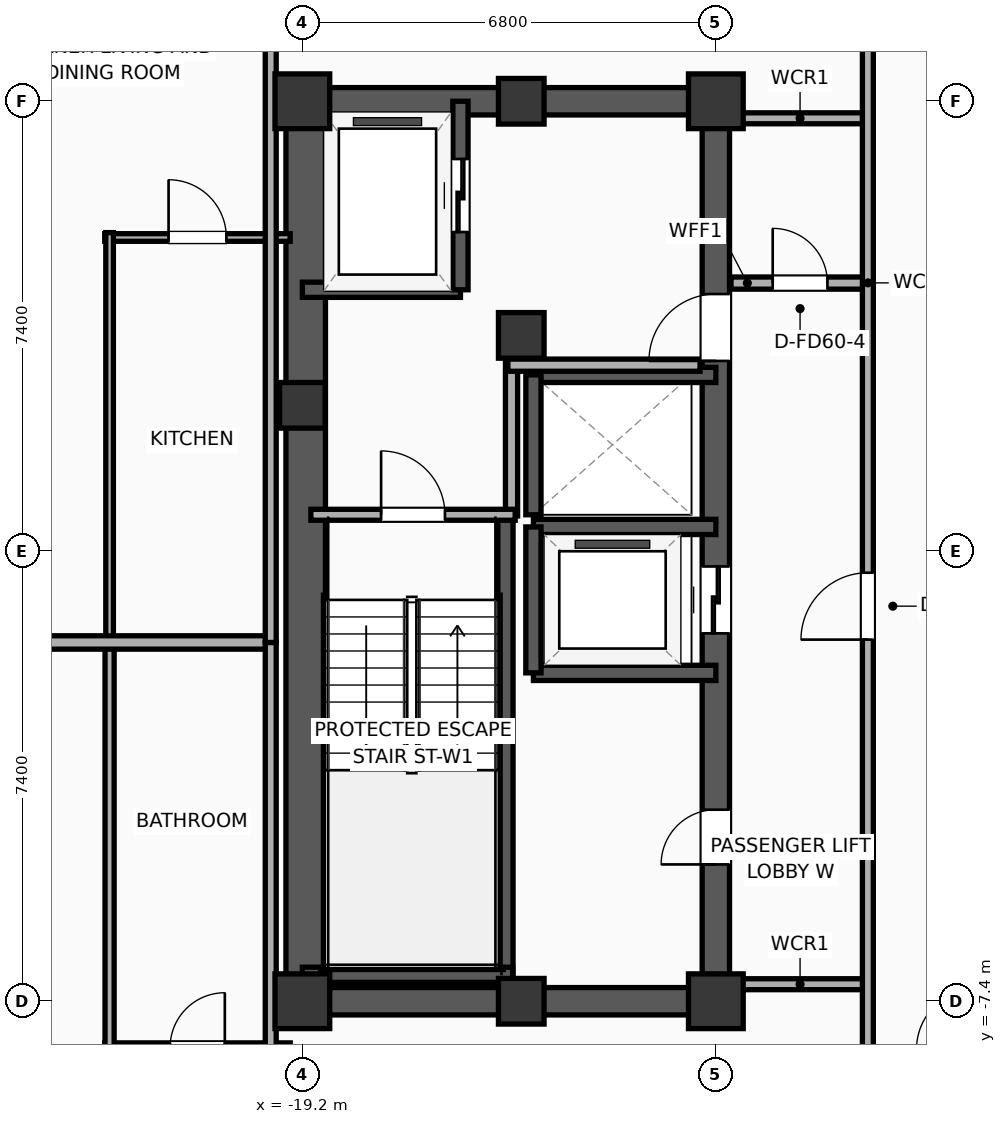
"""IFC4 building model, lengths in metres.
Left out: names, types, materials, properties, quantities, classifications, styles, units other than length and angle.
Written with IfcOpenShell. Run it as: python <this file> out.ifc"""

import sys

from ifc_helpers import new_model, si_unit, direction, frame, frame_2d, origin, origin_2d, place, context, subcontext, project, spatial, rectangle, extrude, element, fill, save


model = new_model("IFC4")
c1 = context("Model", 3, precision=1e-05, world=origin(), true_north=direction((0.0, 1.0)))
c2 = subcontext(c1, "Body", "Model", "MODEL_VIEW")
j1 = project(units=[si_unit("LENGTHUNIT", "METRE"), si_unit("PLANEANGLEUNIT", "RADIAN")], contexts=[c1])
p1 = place(None, origin())
s1 = spatial("IfcSite", under=j1, at=p1, CompositionType="ELEMENT")
p2 = place(p1, origin())
s2 = spatial("IfcBuilding", under=s1, at=p2, CompositionType="ELEMENT")
p3 = place(p2, frame((0.0, 0.0, 156.0)))
s3 = spatial("IfcBuildingStorey", under=s2, at=p3, CompositionType="ELEMENT", Elevation=156.0)
p4 = place(p3, frame((-19.2, -7.4, 0.0), z_axis=(0.0, 0.0, 1.0), x_axis=(1.0, 0.0, 0.0)))
e1 = element("IfcColumn", 1, at=p4, inside=s3, PredefinedType="COLUMN", context=c2, shape_type="SweptSolid", body=[
    extrude(rectangle(XDim=0.9, YDim=0.9, at=origin_2d()), origin(), (0.0, 0.0, 1.0), 3.9),
])
p5 = place(p3, frame((-19.2, 2.4, 0.0), z_axis=(0.0, 0.0, 1.0), x_axis=(1.0, 0.0, 0.0)))
e2 = element("IfcColumn", 2, at=p5, inside=s3, PredefinedType="COLUMN", context=c2, shape_type="SweptSolid", body=[
    extrude(rectangle(XDim=0.75, YDim=0.75, at=origin_2d()), origin(), (0.0, 0.0, 1.0), 3.9),
])
p6 = place(p3, frame((-19.2, 7.4, 0.0), z_axis=(0.0, 0.0, 1.0), x_axis=(1.0, 0.0, 0.0)))
e3 = element("IfcColumn", 3, at=p6, inside=s3, PredefinedType="COLUMN", context=c2, shape_type="SweptSolid", body=[
    extrude(rectangle(XDim=0.9, YDim=0.9, at=origin_2d()), origin(), (0.0, 0.0, 1.0), 3.9),
])
for number, where, z_axis, x_axis in (
    (4, (-15.6, -7.4, 0.0), (0.0, 0.0, 1.0), (1.0, 0.0, 0.0)),
    (5, (-15.6, 7.4, 0.0), (0.0, 0.0, 1.0), (1.0, 0.0, 0.0)),
):
    element("IfcColumn", number, at=place(p3, frame(where, z_axis=z_axis, x_axis=x_axis)), inside=s3, PredefinedType="COLUMN", context=c2, shape_type="SweptSolid", body=[
        extrude(rectangle(XDim=0.75, YDim=0.75, at=origin_2d()), origin(), (0.0, 0.0, 1.0), 3.9),
    ])
p7 = place(p3, frame((-12.4, -7.4, 0.0), z_axis=(0.0, 0.0, 1.0), x_axis=(1.0, 0.0, 0.0)))
e6 = element("IfcColumn", 6, at=p7, inside=s3, PredefinedType="COLUMN", context=c2, shape_type="SweptSolid", body=[
    extrude(rectangle(XDim=0.9, YDim=0.9, at=origin_2d()), origin(), (0.0, 0.0, 1.0), 3.9),
])
p8 = place(p3, frame((-15.6, 3.55, 0.0), z_axis=(0.0, 0.0, 1.0), x_axis=(1.0, 0.0, 0.0)))
e7 = element("IfcColumn", 7, at=p8, inside=s3, PredefinedType="COLUMN", context=c2, shape_type="SweptSolid", body=[
    extrude(rectangle(XDim=0.75, YDim=0.75, at=origin_2d()), origin(), (0.0, 0.0, 1.0), 3.9),
])
p9 = place(p3, frame((-12.4, 7.4, 0.0), z_axis=(0.0, 0.0, 1.0), x_axis=(1.0, 0.0, 0.0)))
e8 = element("IfcColumn", 8, at=p9, inside=s3, PredefinedType="COLUMN", context=c2, shape_type="SweptSolid", body=[
    extrude(rectangle(XDim=0.9, YDim=0.9, at=origin_2d()), origin(), (0.0, 0.0, 1.0), 3.9),
])
for number, where, z_axis, x_axis in (
    (9, (-19.425, -7.4, 0.0), (0.0, 0.0, 1.0), (1.0, 0.0, 0.0)),
    (10, (-19.425, 7.4, 0.0), (0.0, 0.0, 1.0), (1.0, 0.0, 0.0)),
):
    element("IfcWall", number, at=place(p3, frame(where, z_axis=z_axis, x_axis=x_axis)), inside=s3, PredefinedType="SHEAR", context=c2, shape_type="SweptSolid", body=[
        extrude(rectangle(XDim=7.25, YDim=0.45, at=frame_2d((3.625, 0.0))), origin(), (0.0, 0.0, 1.0), 3.65),
    ])
p10 = place(p3, frame((-19.145, -7.4, 0.0), z_axis=(0.0, 0.0, 1.0), x_axis=(0.0, 1.0, 0.0)))
e11 = element("IfcWall", 11, at=p10, inside=s3, PredefinedType="SHEAR", context=c2, shape_type="SweptSolid", body=[
    extrude(rectangle(XDim=14.8, YDim=0.65, at=frame_2d((7.4, 0.0))), origin(), (0.0, 0.0, 1.0), 3.65),
])
p11 = place(p3, frame((-12.4, -7.4, 0.0), z_axis=(0.0, 0.0, 1.0), x_axis=(0.0, 1.0, 0.0)))
e12 = element("IfcWall", 12, at=p11, inside=s3, PredefinedType="SHEAR", context=c2, shape_type="SweptSolid", body=[
    extrude(rectangle(XDim=14.8, YDim=0.45, at=frame_2d((7.4, 0.0))), origin(), (0.0, 0.0, 1.0), 3.65),
])
p12 = place(p11, frame((6.05, 0.0, 0.0)))
e13 = element("IfcOpeningElement", 13, at=p12, cuts=e12, PredefinedType="OPENING", context=c2, shape_type="SweptSolid", body=[
    extrude(rectangle(XDim=1.1, YDim=2.05, at=frame_2d((0.55, 1.025))), frame((0.0, 0.235, 0.0), z_axis=(0.0, -1.0, 0.0), x_axis=(1.0, 0.0, 0.0)), (0.0, 0.0, 1.0), 0.47),
])
p13 = place(p11, frame((10.53, 0.0, 0.0)))
e14 = element("IfcOpeningElement", 14, at=p13, cuts=e12, PredefinedType="OPENING", context=c2, shape_type="SweptSolid", body=[
    extrude(rectangle(XDim=1.1, YDim=2.05, at=frame_2d((0.55, 1.025))), frame((0.0, 0.235, 0.0), z_axis=(0.0, -1.0, 0.0), x_axis=(1.0, 0.0, 0.0)), (0.0, 0.0, 1.0), 0.47),
])
p14 = place(p11, frame((2.25, 0.0, 0.0)))
e15 = element("IfcOpeningElement", 15, at=p14, cuts=e12, PredefinedType="OPENING", context=c2, shape_type="SweptSolid", body=[
    extrude(rectangle(XDim=0.9, YDim=2.05, at=frame_2d((0.45, 1.025))), frame((0.0, 0.235, 0.0), z_axis=(0.0, -1.0, 0.0), x_axis=(1.0, 0.0, 0.0)), (0.0, 0.0, 1.0), 0.47),
])
p15 = place(p3, frame((-15.86, -7.085, 0.0), z_axis=(0.0, 0.0, 1.0), x_axis=(0.0, 1.0, 0.0)))
e16 = element("IfcWall", 16, at=p15, inside=s3, PredefinedType="SOLIDWALL", context=c2, shape_type="SweptSolid", body=[
    extrude(rectangle(XDim=7.685, YDim=0.25, at=frame_2d((3.843, 0.0))), origin(), (0.0, 0.0, 1.0), 3.65),
])
p16 = place(p3, frame((-19.2, -6.965, 0.0), z_axis=(0.0, 0.0, 1.0), x_axis=(1.0, 0.0, 0.0)))
e17 = element("IfcWall", 17, at=p16, inside=s3, PredefinedType="SOLIDWALL", context=c2, shape_type="SweptSolid", body=[
    extrude(rectangle(XDim=3.46, YDim=0.25, at=frame_2d((1.73, 0.0))), origin(), (0.0, 0.0, 1.0), 3.65),
])
p17 = place(p3, frame((-19.2, 4.3, 0.0), z_axis=(0.0, 0.0, 1.0), x_axis=(1.0, 0.0, 0.0)))
e18 = element("IfcWall", 18, at=p17, inside=s3, PredefinedType="SOLIDWALL", context=c2, shape_type="SweptSolid", body=[
    extrude(rectangle(XDim=2.6, YDim=0.25, at=frame_2d((1.3, 0.0))), origin(), (0.0, 0.0, 1.0), 3.65),
])
p18 = place(p3, frame((-16.6, 4.3, 0.0), z_axis=(0.0, 0.0, 1.0), x_axis=(0.0, 1.0, 0.0)))
e19 = element("IfcWall", 19, at=p18, inside=s3, PredefinedType="SOLIDWALL", context=c2, shape_type="SweptSolid", body=[
    extrude(rectangle(XDim=3.1, YDim=0.25, at=frame_2d((1.55, 0.0))), origin(), (0.0, 0.0, 1.0), 3.65),
])
p19 = place(p18, frame((0.95, 0.0, 0.0)))
e20 = element("IfcOpeningElement", 20, at=p19, cuts=e19, PredefinedType="OPENING", context=c2, shape_type="SweptSolid", body=[
    extrude(rectangle(XDim=1.2, YDim=2.05, at=frame_2d((0.6, 1.025))), frame((0.0, 0.135, 0.0), z_axis=(0.0, -1.0, 0.0), x_axis=(1.0, 0.0, 0.0)), (0.0, 0.0, 1.0), 0.27),
])
for number, where, z_axis, x_axis in (
    (21, (-15.4, -2.0, 0.0), (0.0, 0.0, 1.0), (1.0, 0.0, 0.0)),
    (22, (-12.4, 0.4, 0.0), (0.0, 0.0, 1.0), (-1.0, 0.0, 0.0)),
):
    element("IfcWall", number, at=place(p3, frame(where, z_axis=z_axis, x_axis=x_axis)), inside=s3, PredefinedType="SOLIDWALL", context=c2, shape_type="SweptSolid", body=[
        extrude(rectangle(XDim=3.0, YDim=0.25, at=frame_2d((1.5, 0.0))), origin(), (0.0, 0.0, 1.0), 3.65),
    ])
p20 = place(p3, frame((-15.4, 0.4, 0.0), z_axis=(0.0, 0.0, 1.0), x_axis=(0.0, -1.0, 0.0)))
e23 = element("IfcWall", 23, at=p20, inside=s3, PredefinedType="SOLIDWALL", context=c2, shape_type="SweptSolid", body=[
    extrude(rectangle(XDim=2.4, YDim=0.25, at=frame_2d((1.2, 0.0))), origin(), (0.0, 0.0, 1.0), 3.65),
])
p21 = place(p3, frame((-12.4, 2.9, 0.0), z_axis=(0.0, 0.0, 1.0), x_axis=(-1.0, 0.0, 0.0)))
e24 = element("IfcWall", 24, at=p21, inside=s3, PredefinedType="SOLIDWALL", context=c2, shape_type="SweptSolid", body=[
    extrude(rectangle(XDim=3.0, YDim=0.25, at=frame_2d((1.5, 0.0))), origin(), (0.0, 0.0, 1.0), 3.65),
])
p22 = place(p3, frame((-15.4, 2.9, 0.0), z_axis=(0.0, 0.0, 1.0), x_axis=(0.0, -1.0, 0.0)))
e25 = element("IfcWall", 25, at=p22, inside=s3, PredefinedType="SOLIDWALL", context=c2, shape_type="SweptSolid", body=[
    extrude(rectangle(XDim=2.3, YDim=0.25, at=frame_2d((1.15, 0.0))), origin(), (0.0, 0.0, 1.0), 3.65),
])
p23 = place(p3, frame((-15.76, 0.58, 0.0), z_axis=(0.0, 0.0, 1.0), x_axis=(0.0, 1.0, 0.0)))
e26 = element("IfcWall", 26, at=p23, inside=s3, PredefinedType="PARTITIONING", context=c2, shape_type="SweptSolid", body=[
    extrude(rectangle(XDim=2.52, YDim=0.2, at=frame_2d((1.26, 0.0))), origin(), (0.0, 0.0, 1.0), 3.65),
])
p24 = place(p3, frame((-15.82, 3.06, 0.0), z_axis=(0.0, 0.0, 1.0), x_axis=(1.0, 0.0, 0.0)))
e27 = element("IfcWall", 27, at=p24, inside=s3, PredefinedType="PARTITIONING", context=c2, shape_type="SweptSolid", body=[
    extrude(rectangle(XDim=3.16, YDim=0.2, at=frame_2d((1.58, 0.0))), origin(), (0.0, 0.0, 1.0), 3.65),
])
p25 = place(p3, frame((-19.06, 0.6, 0.0), z_axis=(0.0, 0.0, 1.0), x_axis=(1.0, 0.0, 0.0)))
e28 = element("IfcWall", 28, at=p25, inside=s3, PredefinedType="PARTITIONING", context=c2, shape_type="SweptSolid", body=[
    extrude(rectangle(XDim=3.36, YDim=0.18, at=frame_2d((1.68, 0.0))), origin(), (0.0, 0.0, 1.0), 3.65),
])
p26 = place(p25, frame((1.155, 0.0, 0.0)))
e29 = element("IfcOpeningElement", 29, at=p26, cuts=e28, PredefinedType="OPENING", context=c2, shape_type="SweptSolid", body=[
    extrude(rectangle(XDim=1.05, YDim=2.05, at=frame_2d((0.525, 1.025))), frame((0.0, 0.1, 0.0), z_axis=(0.0, -1.0, 0.0), x_axis=(1.0, 0.0, 0.0)), (0.0, 0.0, 1.0), 0.2),
])
p27 = place(p3, frame((-12.15, 4.41, 0.0), z_axis=(0.0, 0.0, 1.0), x_axis=(1.0, 0.0, 0.0)))
e30 = element("IfcWall", 30, at=p27, inside=s3, PredefinedType="PARTITIONING", context=c2, shape_type="SweptSolid", body=[
    extrude(rectangle(XDim=2.27, YDim=0.2, at=frame_2d((1.135, 0.0))), origin(), (0.0, 0.0, 1.0), 3.65),
])
p28 = place(p27, frame((0.685, 0.0, 0.0)))
e31 = element("IfcOpeningElement", 31, at=p28, cuts=e30, PredefinedType="OPENING", context=c2, shape_type="SweptSolid", body=[
    extrude(rectangle(XDim=0.9, YDim=2.05, at=frame_2d((0.45, 1.025))), frame((0.0, 0.11, 0.0), z_axis=(0.0, -1.0, 0.0), x_axis=(1.0, 0.0, 0.0)), (0.0, 0.0, 1.0), 0.22),
])
for number, where, z_axis, x_axis in (
    (32, (-12.15, 7.12, 0.0), (0.0, 0.0, 1.0), (1.0, 0.0, 0.0)),
    (33, (-12.15, -7.12, 0.0), (0.0, 0.0, 1.0), (1.0, 0.0, 0.0)),
):
    element("IfcWall", number, at=place(p3, frame(where, z_axis=z_axis, x_axis=x_axis)), inside=s3, PredefinedType="PARTITIONING", context=c2, shape_type="SweptSolid", body=[
        extrude(rectangle(XDim=2.27, YDim=0.18, at=frame_2d((1.135, 0.0))), origin(), (0.0, 0.0, 1.0), 3.65),
    ])
p29 = place(p3, frame((-9.9, -9.03, 0.0), z_axis=(0.0, 0.0, 1.0), x_axis=(0.0, 1.0, 0.0)))
e34 = element("IfcWall", 34, at=p29, inside=s3, PredefinedType="PARTITIONING", context=c2, shape_type="SweptSolid", body=[
    extrude(rectangle(XDim=18.06, YDim=0.18, at=frame_2d((9.03, 0.0))), origin(), (0.0, 0.0, 1.0), 3.65),
])
p30 = place(p29, frame((7.577, 0.0, 0.0)))
e35 = element("IfcOpeningElement", 35, at=p30, cuts=e34, PredefinedType="OPENING", context=c2, shape_type="SweptSolid", body=[
    extrude(rectangle(XDim=1.1, YDim=2.05, at=frame_2d((0.55, 1.025))), frame((0.0, 0.1, 0.0), z_axis=(0.0, -1.0, 0.0), x_axis=(1.0, 0.0, 0.0)), (0.0, 0.0, 1.0), 0.2),
])
p31 = place(p3, frame((-22.45, -8.16, 0.0), z_axis=(0.0, 0.0, 1.0), x_axis=(1.0, 0.0, 0.0)))
e36 = element("IfcWall", 36, at=p31, inside=s3, PredefinedType="PLUMBINGWALL", context=c2, shape_type="SweptSolid", body=[
    extrude(rectangle(XDim=3.05, YDim=0.15, at=frame_2d((1.525, 0.0))), origin(), (0.0, 0.0, 1.0), 3.04),
])
p32 = place(p31, frame((1.075, 0.0, 0.0)))
e37 = element("IfcOpeningElement", 37, at=p32, cuts=e36, PredefinedType="OPENING", context=c2, shape_type="SweptSolid", body=[
    extrude(rectangle(XDim=0.9, YDim=2.05, at=frame_2d((0.45, 1.025))), frame((0.0, 0.085, 0.0), z_axis=(0.0, -1.0, 0.0), x_axis=(1.0, 0.0, 0.0)), (0.0, 0.0, 1.0), 0.17),
])
p33 = place(p3, frame((-22.37, -8.24, 0.0), z_axis=(0.0, 0.0, 1.0), x_axis=(0.0, 1.0, 0.0)))
e38 = element("IfcWall", 38, at=p33, inside=s3, PredefinedType="PLUMBINGWALL", context=c2, shape_type="SweptSolid", body=[
    extrude(rectangle(XDim=6.72, YDim=0.15, at=frame_2d((3.36, 0.0))), origin(), (0.0, 0.0, 1.0), 3.65),
])
p34 = place(p3, frame((-22.45, 5.16, 0.0), z_axis=(0.0, 0.0, 1.0), x_axis=(1.0, 0.0, 0.0)))
e39 = element("IfcWall", 39, at=p34, inside=s3, PredefinedType="PARTITIONING", context=c2, shape_type="SweptSolid", body=[
    extrude(rectangle(XDim=3.05, YDim=0.125, at=frame_2d((1.525, 0.0))), origin(), (0.0, 0.0, 1.0), 3.65),
])
p35 = place(p34, frame((1.05, 0.0, 0.0)))
e40 = element("IfcOpeningElement", 40, at=p35, cuts=e39, PredefinedType="OPENING", context=c2, shape_type="SweptSolid", body=[
    extrude(rectangle(XDim=0.95, YDim=2.05, at=frame_2d((0.475, 1.025))), frame((0.0, 0.073, 0.0), z_axis=(0.0, -1.0, 0.0), x_axis=(1.0, 0.0, 0.0)), (0.0, 0.0, 1.0), 0.145),
])
p36 = place(p3, frame((-22.37, -1.48, 0.0), z_axis=(0.0, 0.0, 1.0), x_axis=(0.0, 1.0, 0.0)))
e41 = element("IfcWall", 41, at=p36, inside=s3, PredefinedType="PARTITIONING", context=c2, shape_type="SweptSolid", body=[
    extrude(rectangle(XDim=6.72, YDim=0.125, at=frame_2d((3.36, 0.0))), origin(), (0.0, 0.0, 1.0), 3.65),
])
p37 = place(p3, frame((-19.72, -1.5, 0.0), z_axis=(0.0, 0.0, 1.0), x_axis=(-1.0, 0.0, 0.0)))
e42 = element("IfcWall", 42, at=p37, inside=s3, PredefinedType="PARTITIONING", context=c2, shape_type="SweptSolid", body=[
    extrude(rectangle(XDim=13.179, YDim=0.22, at=frame_2d((6.589, 0.0))), origin(), (0.0, 0.0, 1.0), 3.65),
])
p38 = place(p3, frame((-19.72, -22.678, 0.0), z_axis=(0.0, 0.0, 1.0), x_axis=(0.0, 1.0, 0.0)))
e43 = element("IfcWall", 43, at=p38, inside=s3, PredefinedType="PARTITIONING", context=c2, shape_type="SweptSolid", body=[
    extrude(rectangle(XDim=21.178, YDim=0.18, at=frame_2d((10.589, 0.0))), origin(), (0.0, 0.0, 1.0), 3.65),
])
p39 = place(p38, frame((12.547, 0.0, 0.0)))
e44 = element("IfcOpeningElement", 44, at=p39, cuts=e43, PredefinedType="OPENING", context=c2, shape_type="SweptSolid", body=[
    extrude(rectangle(XDim=0.9, YDim=2.05, at=frame_2d((0.45, 1.025))), frame((0.0, 0.1, 0.0), z_axis=(0.0, -1.0, 0.0), x_axis=(1.0, 0.0, 0.0)), (0.0, 0.0, 1.0), 0.2),
])
p40 = place(p3, frame((-19.72, -1.5, 0.0), z_axis=(0.0, 0.0, 1.0), x_axis=(0.0, 1.0, 0.0)))
e45 = element("IfcWall", 45, at=p40, inside=s3, PredefinedType="PARTITIONING", context=c2, shape_type="SweptSolid", body=[
    extrude(rectangle(XDim=19.505, YDim=0.18, at=frame_2d((9.752, 0.0))), origin(), (0.0, 0.0, 1.0), 3.04),
])
p41 = place(p40, frame((10.73, 0.0, 0.0)))
e46 = element("IfcOpeningElement", 46, at=p41, cuts=e45, PredefinedType="OPENING", context=c2, shape_type="SweptSolid", body=[
    extrude(rectangle(XDim=0.9, YDim=2.05, at=frame_2d((0.45, 1.025))), frame((0.0, 0.1, 0.0), z_axis=(0.0, -1.0, 0.0), x_axis=(1.0, 0.0, 0.0)), (0.0, 0.0, 1.0), 0.2),
])
p42 = place(p19, origin())
e47 = element("IfcDoor", 47, at=p42, inside=s3, OperationType="SLIDING_TO_LEFT", PredefinedType="DOOR", context=c2, shape_type="SweptSolid", body=[
    extrude(rectangle(XDim=1.2, YDim=2.05, at=frame_2d((0.6, 1.025))), frame((0.0, 0.025, 0.0), z_axis=(0.0, -1.0, 0.0), x_axis=(1.0, 0.0, 0.0)), (0.0, 0.0, 1.0), 0.05),
])
fill(e20, e47)
p43 = place(p12, origin())
e48 = element("IfcDoor", 48, at=p43, inside=s3, OperationType="SLIDING_TO_LEFT", PredefinedType="DOOR", context=c2, shape_type="SweptSolid", body=[
    extrude(rectangle(XDim=1.1, YDim=2.05, at=frame_2d((0.55, 1.025))), frame((0.0, 0.025, 0.0), z_axis=(0.0, -1.0, 0.0), x_axis=(1.0, 0.0, 0.0)), (0.0, 0.0, 1.0), 0.05),
])
fill(e13, e48)
p44 = place(p26, origin())
e49 = element("IfcDoor", 49, at=p44, inside=s3, OperationType="SINGLE_SWING_LEFT", PredefinedType="DOOR", context=c2, shape_type="SweptSolid", body=[
    extrude(rectangle(XDim=1.05, YDim=2.05, at=frame_2d((0.525, 1.025))), frame((0.0, 0.025, 0.0), z_axis=(0.0, -1.0, 0.0), x_axis=(1.0, 0.0, 0.0)), (0.0, 0.0, 1.0), 0.05),
])
fill(e29, e49)
p45 = place(p28, origin())
e50 = element("IfcDoor", 50, at=p45, inside=s3, OperationType="SINGLE_SWING_LEFT", PredefinedType="DOOR", context=c2, shape_type="SweptSolid", body=[
    extrude(rectangle(XDim=0.9, YDim=2.05, at=frame_2d((0.45, 1.025))), frame((0.0, 0.025, 0.0), z_axis=(0.0, -1.0, 0.0), x_axis=(1.0, 0.0, 0.0)), (0.0, 0.0, 1.0), 0.05),
])
fill(e31, e50)
p46 = place(p30, origin())
e51 = element("IfcDoor", 51, at=p46, inside=s3, OperationType="SINGLE_SWING_LEFT", PredefinedType="DOOR", context=c2, shape_type="SweptSolid", body=[
    extrude(rectangle(XDim=1.1, YDim=2.05, at=frame_2d((0.55, 1.025))), frame((0.0, 0.025, 0.0), z_axis=(0.0, -1.0, 0.0), x_axis=(1.0, 0.0, 0.0)), (0.0, 0.0, 1.0), 0.05),
])
fill(e35, e51)
p47 = place(p35, origin())
e52 = element("IfcDoor", 52, at=p47, inside=s3, OperationType="SINGLE_SWING_LEFT", PredefinedType="DOOR", context=c2, shape_type="SweptSolid", body=[
    extrude(rectangle(XDim=0.95, YDim=2.05, at=frame_2d((0.475, 1.025))), frame((0.0, 0.025, 0.0), z_axis=(0.0, -1.0, 0.0), x_axis=(1.0, 0.0, 0.0)), (0.0, 0.0, 1.0), 0.05),
])
fill(e40, e52)
p48 = place(p13, origin())
e53 = element("IfcDoor", 53, at=p48, inside=s3, OperationType="SINGLE_SWING_LEFT", PredefinedType="DOOR", context=c2, shape_type="SweptSolid", body=[
    extrude(rectangle(XDim=1.1, YDim=2.05, at=frame_2d((0.55, 1.025))), frame((0.0, 0.025, 0.0), z_axis=(0.0, -1.0, 0.0), x_axis=(1.0, 0.0, 0.0)), (0.0, 0.0, 1.0), 0.05),
])
fill(e14, e53)
p49 = place(p14, origin())
e54 = element("IfcDoor", 54, at=p49, inside=s3, OperationType="SINGLE_SWING_LEFT", PredefinedType="DOOR", context=c2, shape_type="SweptSolid", body=[
    extrude(rectangle(XDim=0.9, YDim=2.05, at=frame_2d((0.45, 1.025))), frame((0.0, 0.025, 0.0), z_axis=(0.0, -1.0, 0.0), x_axis=(1.0, 0.0, 0.0)), (0.0, 0.0, 1.0), 0.05),
])
fill(e15, e54)
save(model, sys.argv[1])
